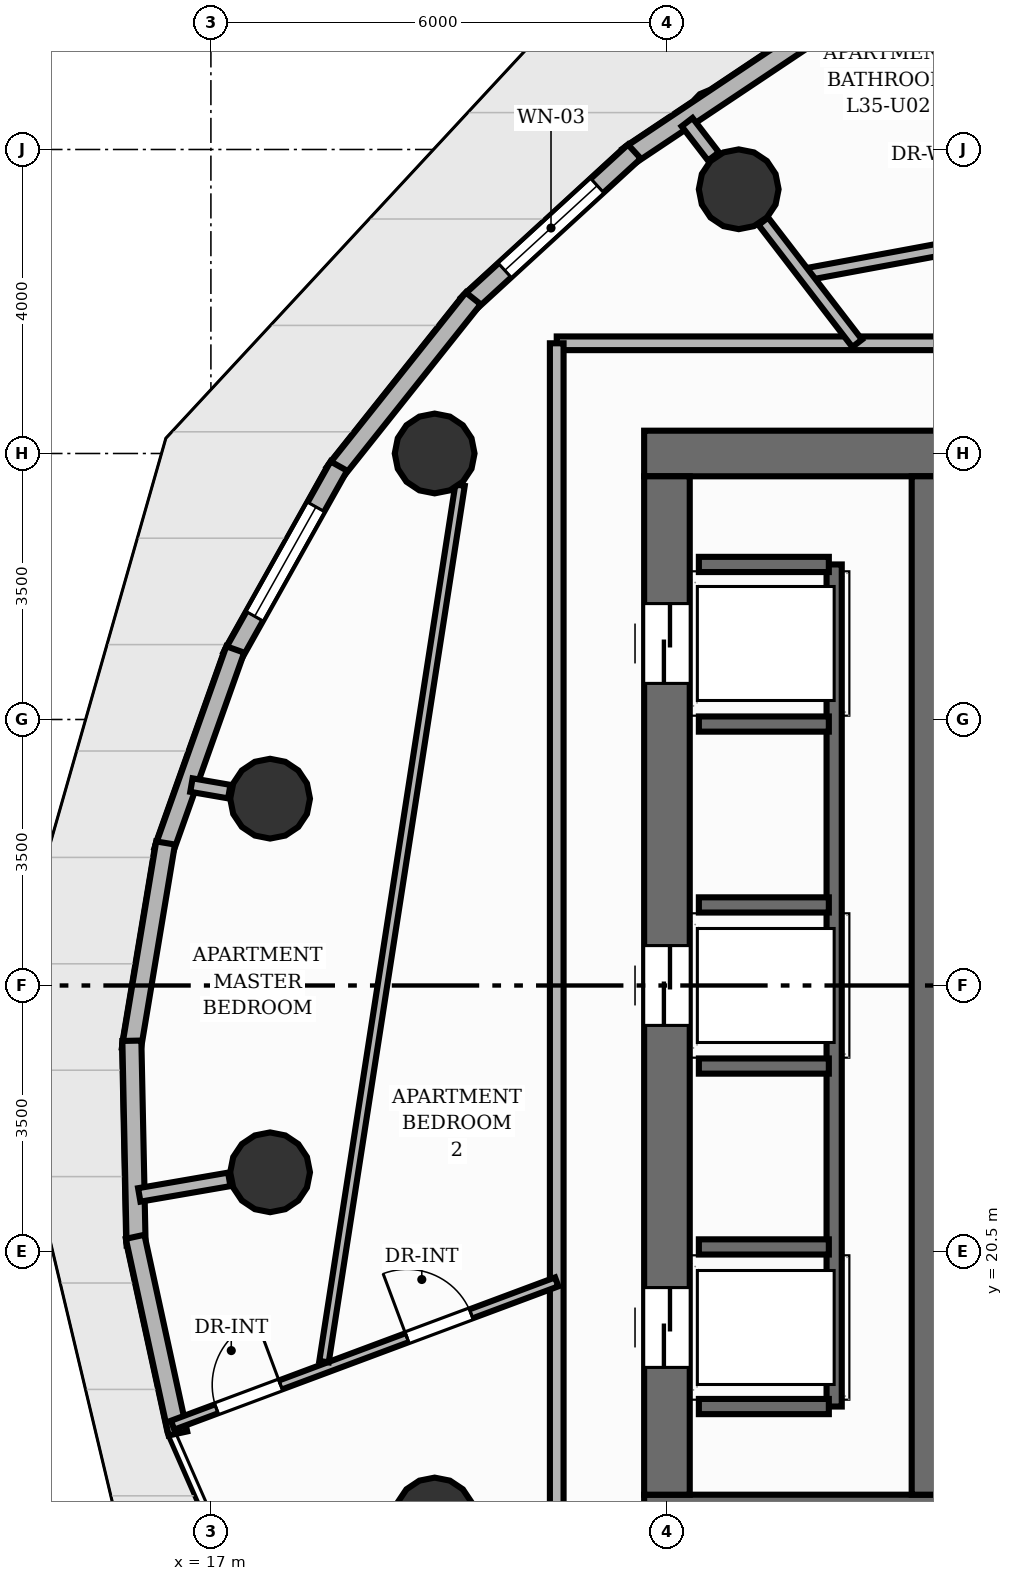
"""IFC4 building model, lengths in metres.
Left out: names, types, materials, properties, quantities, classifications, styles, units other than length and angle.
Written with IfcOpenShell. Run it as: python <this file> out.ifc"""

import sys

from ifc_helpers import new_model, si_unit, direction, frame, frame_2d, origin, origin_2d, place, context, subcontext, project, spatial, rectangle, circle, extrude, element, fill, save


model = new_model("IFC4")
c1 = context("Model", 3, precision=1e-05, world=origin(), true_north=direction((0.0, 1.0)))
c2 = subcontext(c1, "Body", "Model", "MODEL_VIEW")
j1 = project(units=[si_unit("LENGTHUNIT", "METRE"), si_unit("PLANEANGLEUNIT", "RADIAN")], contexts=[c1])
p1 = place(None, origin())
s1 = spatial("IfcSite", under=j1, at=p1, CompositionType="ELEMENT")
p2 = place(p1, origin())
s2 = spatial("IfcBuilding", under=s1, at=p2, CompositionType="ELEMENT")
p3 = place(p2, frame((0.0, 0.0, 120.16)))
s3 = spatial("IfcBuildingStorey", under=s2, at=p3, CompositionType="ELEMENT", Elevation=120.16)
p4 = place(p3, frame((22.7, 17.0, 0.0), z_axis=(0.0, 0.0, 1.0), x_axis=(1.0, 0.0, 0.0)))
e1 = element("IfcWall", 1, at=p4, inside=s3, PredefinedType="SHEAR", context=c2, shape_type="SweptSolid", body=[
    extrude(rectangle(XDim=18.6, YDim=0.6, at=frame_2d((9.3, 0.0))), origin(), (0.0, 0.0, 1.0), 3.2),
])
p5 = place(p4, frame((5.8, 0.0, 0.0)))
e2 = element("IfcOpeningElement", 2, at=p5, cuts=e1, PredefinedType="OPENING", context=c2, shape_type="SweptSolid", body=[
    extrude(rectangle(XDim=1.1, YDim=2.15, at=frame_2d((0.55, 1.075))), frame((0.0, 0.31, 0.0), z_axis=(0.0, -1.0, 0.0), x_axis=(1.0, 0.0, 0.0)), (0.0, 0.0, 1.0), 0.62),
])
p6 = place(p4, frame((9.35, 0.0, 0.0)))
e3 = element("IfcOpeningElement", 3, at=p6, cuts=e1, PredefinedType="OPENING", context=c2, shape_type="SweptSolid", body=[
    extrude(rectangle(XDim=0.9, YDim=2.1, at=frame_2d((0.45, 1.05))), frame((0.0, 0.31, 0.0), z_axis=(0.0, -1.0, 0.0), x_axis=(1.0, 0.0, 0.0)), (0.0, 0.0, 1.0), 0.62),
])
p7 = place(p3, frame((22.7, 31.0, 0.0), z_axis=(0.0, 0.0, 1.0), x_axis=(1.0, 0.0, 0.0)))
e4 = element("IfcWall", 4, at=p7, inside=s3, PredefinedType="SHEAR", context=c2, shape_type="SweptSolid", body=[
    extrude(rectangle(XDim=18.6, YDim=0.6, at=frame_2d((9.3, 0.0))), origin(), (0.0, 0.0, 1.0), 3.2),
])
p8 = place(p7, frame((11.7, 0.0, 0.0)))
e5 = element("IfcOpeningElement", 5, at=p8, cuts=e4, PredefinedType="OPENING", context=c2, shape_type="SweptSolid", body=[
    extrude(rectangle(XDim=1.1, YDim=2.15, at=frame_2d((0.55, 1.075))), frame((0.0, 0.31, 0.0), z_axis=(0.0, -1.0, 0.0), x_axis=(1.0, 0.0, 0.0)), (0.0, 0.0, 1.0), 0.62),
])
p9 = place(p3, frame((23.0, 17.3, 0.0), z_axis=(0.0, 0.0, 1.0), x_axis=(0.0, 1.0, 0.0)))
e6 = element("IfcWall", 6, at=p9, inside=s3, PredefinedType="SHEAR", context=c2, shape_type="SweptSolid", body=[
    extrude(rectangle(XDim=13.4, YDim=0.6, at=frame_2d((6.7, 0.0))), origin(), (0.0, 0.0, 1.0), 3.2),
])
p10 = place(p9, frame((1.675, 0.0, 0.0)))
e7 = element("IfcOpeningElement", 7, at=p10, cuts=e6, PredefinedType="OPENING", context=c2, shape_type="SweptSolid", body=[
    extrude(rectangle(XDim=1.05, YDim=2.15, at=frame_2d((0.525, 1.075))), frame((0.0, 0.31, 0.0), z_axis=(0.0, -1.0, 0.0), x_axis=(1.0, 0.0, 0.0)), (0.0, 0.0, 1.0), 0.62),
])
p11 = place(p9, frame((6.175, 0.0, 0.0)))
e8 = element("IfcOpeningElement", 8, at=p11, cuts=e6, PredefinedType="OPENING", context=c2, shape_type="SweptSolid", body=[
    extrude(rectangle(XDim=1.05, YDim=2.15, at=frame_2d((0.525, 1.075))), frame((0.0, 0.31, 0.0), z_axis=(0.0, -1.0, 0.0), x_axis=(1.0, 0.0, 0.0)), (0.0, 0.0, 1.0), 0.62),
])
p12 = place(p9, frame((10.675, 0.0, 0.0)))
e9 = element("IfcOpeningElement", 9, at=p12, cuts=e6, PredefinedType="OPENING", context=c2, shape_type="SweptSolid", body=[
    extrude(rectangle(XDim=1.05, YDim=2.15, at=frame_2d((0.525, 1.075))), frame((0.0, 0.31, 0.0), z_axis=(0.0, -1.0, 0.0), x_axis=(1.0, 0.0, 0.0)), (0.0, 0.0, 1.0), 0.62),
])
p13 = place(p3, frame((26.5, 17.3, 0.0), z_axis=(0.0, 0.0, 1.0), x_axis=(0.0, 1.0, 0.0)))
e10 = element("IfcWall", 10, at=p13, inside=s3, PredefinedType="SHEAR", context=c2, shape_type="SweptSolid", body=[
    extrude(rectangle(XDim=13.4, YDim=0.56, at=frame_2d((6.7, 0.0))), origin(), (0.0, 0.0, 1.0), 3.2),
])
for number, where, z_axis, x_axis in (
    (11, (23.944, 34.477, 0.0), (0.0, 0.0, 1.0), (1.0, 0.0, 0.0)),
    (12, (19.944, 31.0, 0.0), (0.0, 0.0, 1.0), (1.0, 0.0, 0.0)),
    (13, (17.779, 26.458, 0.0), (0.0, 0.0, 1.0), (1.0, 0.0, 0.0)),
    (14, (17.779, 21.542, 0.0), (0.0, 0.0, 1.0), (1.0, 0.0, 0.0)),
    (15, (19.944, 17.0, 0.0), (0.0, 0.0, 1.0), (1.0, 0.0, 0.0)),
):
    element("IfcColumn", number, at=place(p3, frame(where, z_axis=z_axis, x_axis=x_axis)), inside=s3, PredefinedType="COLUMN", context=c2, shape_type="SweptSolid", body=[
        extrude(circle(Radius=0.525, at=origin_2d()), origin(), (0.0, 0.0, 1.0), 3.2),
    ])
p14 = place(p3, frame((22.486, 34.906, 0.0), z_axis=(0.0, 0.0, 1.0), x_axis=(0.831523781892, 0.555489153943, 0.0)))
e16 = element("IfcWall", 16, at=p14, inside=s3, PredefinedType="SOLIDWALL", context=c2, shape_type="SweptSolid", body=[
    extrude(rectangle(XDim=2.998, YDim=0.25, at=frame_2d((1.499, 0.0))), origin(), (0.0, 0.0, 1.0), 2.96),
])
p15 = place(p3, frame((20.377, 32.961, 0.0), z_axis=(0.0, 0.0, 1.0), x_axis=(0.737072437991, 0.675813747384, 0.0)))
e17 = element("IfcWall", 17, at=p15, inside=s3, PredefinedType="SOLIDWALL", context=c2, shape_type="SweptSolid", body=[
    extrude(rectangle(XDim=2.977, YDim=0.25, at=frame_2d((1.489, 0.0))), origin(), (0.0, 0.0, 1.0), 2.96),
])
p16 = place(p15, frame((0.664, 0.0, 0.85)))
e18 = element("IfcOpeningElement", 18, at=p16, cuts=e17, PredefinedType="OPENING", context=c2, shape_type="SweptSolid", body=[
    extrude(rectangle(XDim=1.65, YDim=1.55, at=frame_2d((0.825, 0.775))), frame((0.0, 0.135, 0.0), z_axis=(0.0, -1.0, 0.0), x_axis=(1.0, 0.0, 0.0)), (0.0, 0.0, 1.0), 0.27),
])
p17 = place(p3, frame((18.622, 30.743, 0.0), z_axis=(0.0, 0.0, 1.0), x_axis=(0.62291924477, 0.782286146174, 0.0)))
e19 = element("IfcWall", 19, at=p17, inside=s3, PredefinedType="SOLIDWALL", context=c2, shape_type="SweptSolid", body=[
    extrude(rectangle(XDim=2.937, YDim=0.25, at=frame_2d((1.468, 0.0))), origin(), (0.0, 0.0, 1.0), 2.96),
])
p18 = place(p3, frame((17.275, 28.32, 0.0), z_axis=(0.0, 0.0, 1.0), x_axis=(0.488840693739, 0.872373071652, 0.0)))
e20 = element("IfcWall", 20, at=p18, inside=s3, PredefinedType="SOLIDWALL", context=c2, shape_type="SweptSolid", body=[
    extrude(rectangle(XDim=2.882, YDim=0.25, at=frame_2d((1.441, 0.0))), origin(), (0.0, 0.0, 1.0), 2.96),
])
p19 = place(p18, frame((0.616, 0.0, 0.85)))
e21 = element("IfcOpeningElement", 21, at=p19, cuts=e20, PredefinedType="OPENING", context=c2, shape_type="SweptSolid", body=[
    extrude(rectangle(XDim=1.65, YDim=1.55, at=frame_2d((0.825, 0.775))), frame((0.0, 0.135, 0.0), z_axis=(0.0, -1.0, 0.0), x_axis=(1.0, 0.0, 0.0)), (0.0, 0.0, 1.0), 0.27),
])
p20 = place(p3, frame((16.375, 25.767, 0.0), z_axis=(0.0, 0.0, 1.0), x_axis=(0.335397655518, 0.942076649043, 0.0)))
e22 = element("IfcWall", 22, at=p20, inside=s3, PredefinedType="SOLIDWALL", context=c2, shape_type="SweptSolid", body=[
    extrude(rectangle(XDim=2.818, YDim=0.25, at=frame_2d((1.409, 0.0))), origin(), (0.0, 0.0, 1.0), 2.96),
])
p21 = place(p3, frame((15.952, 23.16, 0.0), z_axis=(0.0, 0.0, 1.0), x_axis=(0.164125638075, 0.986439443112, 0.0)))
e23 = element("IfcWall", 23, at=p21, inside=s3, PredefinedType="SOLIDWALL", context=c2, shape_type="SweptSolid", body=[
    extrude(rectangle(XDim=2.752, YDim=0.25, at=frame_2d((1.376, 0.0))), origin(), (0.0, 0.0, 1.0), 2.96),
])
p22 = place(p3, frame((16.016, 20.581, 0.0), z_axis=(0.0, 0.0, 1.0), x_axis=(-0.020851468483, 0.999782584496, 0.0)))
e24 = element("IfcWall", 24, at=p22, inside=s3, PredefinedType="SOLIDWALL", context=c2, shape_type="SweptSolid", body=[
    extrude(rectangle(XDim=2.693, YDim=0.25, at=frame_2d((1.346, 0.0))), origin(), (0.0, 0.0, 1.0), 2.96),
])
p23 = place(p3, frame((16.566, 18.106, 0.0), z_axis=(0.0, 0.0, 1.0), x_axis=(-0.212506194302, 0.977159719485, 0.0)))
e25 = element("IfcWall", 25, at=p23, inside=s3, PredefinedType="SOLIDWALL", context=c2, shape_type="SweptSolid", body=[
    extrude(rectangle(XDim=2.648, YDim=0.25, at=frame_2d((1.324, 0.0))), origin(), (0.0, 0.0, 1.0), 2.96),
])
p24 = place(p3, frame((25.2, 18.46, 0.0), z_axis=(0.0, 0.0, 1.0), x_axis=(0.0, 1.0, 0.0)))
e26 = element("IfcWall", 26, at=p24, inside=s3, PredefinedType="SHEAR", context=c2, shape_type="SweptSolid", body=[
    extrude(rectangle(XDim=11.08, YDim=0.2, at=frame_2d((5.54, 0.0))), origin(), (0.0, 0.0, 1.0), 3.2),
])
for number, where, z_axis, x_axis in (
    (27, (23.42, 18.46, 0.0), (0.0, 0.0, 1.0), (1.0, 0.0, 0.0)),
    (28, (23.42, 29.54, 0.0), (0.0, 0.0, 1.0), (1.0, 0.0, 0.0)),
    (29, (23.42, 20.56, 0.0), (0.0, 0.0, 1.0), (1.0, 0.0, 0.0)),
    (30, (23.42, 22.94, 0.0), (0.0, 0.0, 1.0), (1.0, 0.0, 0.0)),
    (31, (23.42, 25.06, 0.0), (0.0, 0.0, 1.0), (1.0, 0.0, 0.0)),
    (32, (23.42, 27.44, 0.0), (0.0, 0.0, 1.0), (1.0, 0.0, 0.0)),
):
    element("IfcWall", number, at=place(p3, frame(where, z_axis=z_axis, x_axis=x_axis)), inside=s3, PredefinedType="SHEAR", context=c2, shape_type="SweptSolid", body=[
        extrude(rectangle(XDim=1.71, YDim=0.2, at=frame_2d((0.855, 0.0))), origin(), (0.0, 0.0, 1.0), 3.2),
    ])
p25 = place(p3, frame((23.612, 34.908, 0.0), z_axis=(0.0, 0.0, 1.0), x_axis=(-0.609627883901, 0.792687733708, 0.0)))
e33 = element("IfcWall", 33, at=p25, inside=s3, PredefinedType="PARTITIONING", context=c2, shape_type="SweptSolid", body=[
    extrude(rectangle(XDim=0.57, YDim=0.18, at=frame_2d((0.285, 0.0))), origin(), (0.0, 0.0, 1.0), 2.336),
])
p26 = place(p3, frame((17.242, 26.551, 0.0), z_axis=(0.0, 0.0, 1.0), x_axis=(-0.985356748875, 0.170505358997, 0.0)))
e34 = element("IfcWall", 34, at=p26, inside=s3, PredefinedType="PARTITIONING", context=c2, shape_type="SweptSolid", body=[
    extrude(rectangle(XDim=0.505, YDim=0.18, at=frame_2d((0.253, 0.0))), origin(), (0.0, 0.0, 1.0), 2.336),
])
p27 = place(p3, frame((17.242, 21.449, 0.0), z_axis=(0.0, 0.0, 1.0), x_axis=(-0.985370848046, -0.170423859309, 0.0)))
e35 = element("IfcWall", 35, at=p27, inside=s3, PredefinedType="PARTITIONING", context=c2, shape_type="SweptSolid", body=[
    extrude(rectangle(XDim=1.202, YDim=0.18, at=frame_2d((0.601, 0.0))), origin(), (0.0, 0.0, 1.0), 2.336),
])
p28 = place(p3, frame((21.55, 32.45, 0.0), z_axis=(0.0, 0.0, 1.0), x_axis=(1.0, 0.0, 0.0)))
e36 = element("IfcWall", 36, at=p28, inside=s3, PredefinedType="PARTITIONING", context=c2, shape_type="SweptSolid", body=[
    extrude(rectangle(XDim=20.9, YDim=0.18, at=frame_2d((10.45, 0.0))), origin(), (0.0, 0.0, 1.0), 2.955),
])
p29 = place(p28, frame((10.22, 0.0, 0.0)))
e37 = element("IfcOpeningElement", 37, at=p29, cuts=e36, PredefinedType="OPENING", context=c2, shape_type="SweptSolid", body=[
    extrude(rectangle(XDim=1.05, YDim=2.15, at=frame_2d((0.525, 1.075))), frame((0.0, 0.1, 0.0), z_axis=(0.0, -1.0, 0.0), x_axis=(1.0, 0.0, 0.0)), (0.0, 0.0, 1.0), 0.2),
])
p30 = place(p3, frame((21.55, 15.61, 0.0), z_axis=(0.0, 0.0, 1.0), x_axis=(0.0, 1.0, 0.0)))
e38 = element("IfcWall", 38, at=p30, inside=s3, PredefinedType="PARTITIONING", context=c2, shape_type="SweptSolid", body=[
    extrude(rectangle(XDim=16.84, YDim=0.18, at=frame_2d((8.42, 0.0))), origin(), (0.0, 0.0, 1.0), 2.955),
])
p31 = place(p3, frame((30.203, 34.354, 0.0), z_axis=(0.0, 0.0, 1.0), x_axis=(-0.983240381988, -0.182313881064, 0.0)))
e39 = element("IfcWall", 39, at=p31, inside=s3, PredefinedType="PLUMBINGWALL", context=c2, shape_type="SweptSolid", body=[
    extrude(rectangle(XDim=5.488, YDim=0.16, at=frame_2d((2.744, 0.0))), origin(), (0.0, 0.0, 1.0), 2.955),
])
p32 = place(p31, frame((0.631, 0.0, 0.0)))
e40 = element("IfcOpeningElement", 40, at=p32, cuts=e39, PredefinedType="OPENING", context=c2, shape_type="SweptSolid", body=[
    extrude(rectangle(XDim=0.9, YDim=2.1, at=frame_2d((0.45, 1.05))), frame((0.0, 0.09, 0.0), z_axis=(0.0, -1.0, 0.0), x_axis=(1.0, 0.0, 0.0)), (0.0, 0.0, 1.0), 0.18),
])
p33 = place(p3, frame((25.502, 32.45, 0.0), z_axis=(0.0, 0.0, 1.0), x_axis=(-0.609541819787, 0.792753915115, 0.0)))
e41 = element("IfcWall", 41, at=p33, inside=s3, PredefinedType="PLUMBINGWALL", context=c2, shape_type="SweptSolid", body=[
    extrude(rectangle(XDim=2.025, YDim=0.16, at=frame_2d((1.013, 0.0))), origin(), (0.0, 0.0, 1.0), 2.336),
])
p34 = place(p3, frame((16.496, 18.214, 0.0), z_axis=(0.0, 0.0, 1.0), x_axis=(0.936891530049, 0.349620166641, 0.0)))
e42 = element("IfcWall", 42, at=p34, inside=s3, PredefinedType="PARTITIONING", context=c2, shape_type="SweptSolid", body=[
    extrude(rectangle(XDim=5.394, YDim=0.125, at=frame_2d((2.697, 0.0))), origin(), (0.0, 0.0, 1.0), 2.955),
])
p35 = place(p34, frame((0.616, 0.0, 0.0)))
e43 = element("IfcOpeningElement", 43, at=p35, cuts=e42, PredefinedType="OPENING", context=c2, shape_type="SweptSolid", body=[
    extrude(rectangle(XDim=0.9, YDim=2.1, at=frame_2d((0.45, 1.05))), frame((0.0, 0.073, 0.0), z_axis=(0.0, -1.0, 0.0), x_axis=(1.0, 0.0, 0.0)), (0.0, 0.0, 1.0), 0.145),
])
p36 = place(p34, frame((3.292, 0.0, 0.0)))
e44 = element("IfcOpeningElement", 44, at=p36, cuts=e42, PredefinedType="OPENING", context=c2, shape_type="SweptSolid", body=[
    extrude(rectangle(XDim=0.9, YDim=2.1, at=frame_2d((0.45, 1.05))), frame((0.0, 0.073, 0.0), z_axis=(0.0, -1.0, 0.0), x_axis=(1.0, 0.0, 0.0)), (0.0, 0.0, 1.0), 0.145),
])
p37 = place(p3, frame((20.278, 30.583, 0.0), z_axis=(0.0, 0.0, 1.0), x_axis=(-0.153357052545, -0.988170842737, 0.0)))
e45 = element("IfcWall", 45, at=p37, inside=s3, PredefinedType="PARTITIONING", context=c2, shape_type="SweptSolid", body=[
    extrude(rectangle(XDim=11.671, YDim=0.125, at=frame_2d((5.835, 0.0))), origin(), (0.0, 0.0, 1.0), 2.955),
])
p38 = place(p16, origin())
e46 = element("IfcWindow", 46, at=p38, inside=s3, PartitioningType="SINGLE_PANEL", PredefinedType="WINDOW", context=c2, shape_type="SweptSolid", body=[
    extrude(rectangle(XDim=1.65, YDim=1.55, at=frame_2d((0.825, 0.775))), frame((0.0, 0.03, 0.0), z_axis=(0.0, -1.0, 0.0), x_axis=(1.0, 0.0, 0.0)), (0.0, 0.0, 1.0), 0.06),
])
fill(e18, e46)
p39 = place(p19, origin())
e47 = element("IfcWindow", 47, at=p39, inside=s3, PartitioningType="SINGLE_PANEL", PredefinedType="WINDOW", context=c2, shape_type="SweptSolid", body=[
    extrude(rectangle(XDim=1.65, YDim=1.55, at=frame_2d((0.825, 0.775))), frame((0.0, 0.03, 0.0), z_axis=(0.0, -1.0, 0.0), x_axis=(1.0, 0.0, 0.0)), (0.0, 0.0, 1.0), 0.06),
])
fill(e21, e47)
p40 = place(p10, origin())
e48 = element("IfcDoor", 48, at=p40, inside=s3, OperationType="DOUBLE_DOOR_SLIDING", PredefinedType="DOOR", context=c2, shape_type="SweptSolid", body=[
    extrude(rectangle(XDim=1.05, YDim=2.15, at=frame_2d((0.525, 1.075))), frame((0.0, 0.025, 0.0), z_axis=(0.0, -1.0, 0.0), x_axis=(1.0, 0.0, 0.0)), (0.0, 0.0, 1.0), 0.05),
])
fill(e7, e48)
p41 = place(p11, origin())
e49 = element("IfcDoor", 49, at=p41, inside=s3, OperationType="DOUBLE_DOOR_SLIDING", PredefinedType="DOOR", context=c2, shape_type="SweptSolid", body=[
    extrude(rectangle(XDim=1.05, YDim=2.15, at=frame_2d((0.525, 1.075))), frame((0.0, 0.025, 0.0), z_axis=(0.0, -1.0, 0.0), x_axis=(1.0, 0.0, 0.0)), (0.0, 0.0, 1.0), 0.05),
])
fill(e8, e49)
p42 = place(p12, origin())
e50 = element("IfcDoor", 50, at=p42, inside=s3, OperationType="DOUBLE_DOOR_SLIDING", PredefinedType="DOOR", context=c2, shape_type="SweptSolid", body=[
    extrude(rectangle(XDim=1.05, YDim=2.15, at=frame_2d((0.525, 1.075))), frame((0.0, 0.025, 0.0), z_axis=(0.0, -1.0, 0.0), x_axis=(1.0, 0.0, 0.0)), (0.0, 0.0, 1.0), 0.05),
])
fill(e9, e50)
p43 = place(p35, origin())
e51 = element("IfcDoor", 51, at=p43, inside=s3, OperationType="SINGLE_SWING_RIGHT", PredefinedType="DOOR", context=c2, shape_type="SweptSolid", body=[
    extrude(rectangle(XDim=0.9, YDim=2.1, at=frame_2d((0.45, 1.05))), frame((0.0, 0.025, 0.0), z_axis=(0.0, -1.0, 0.0), x_axis=(1.0, 0.0, 0.0)), (0.0, 0.0, 1.0), 0.05),
])
fill(e43, e51)
p44 = place(p36, origin())
e52 = element("IfcDoor", 52, at=p44, inside=s3, OperationType="SINGLE_SWING_LEFT", PredefinedType="DOOR", context=c2, shape_type="SweptSolid", body=[
    extrude(rectangle(XDim=0.9, YDim=2.1, at=frame_2d((0.45, 1.05))), frame((0.0, 0.025, 0.0), z_axis=(0.0, -1.0, 0.0), x_axis=(1.0, 0.0, 0.0)), (0.0, 0.0, 1.0), 0.05),
])
fill(e44, e52)
save(model, sys.argv[1])
